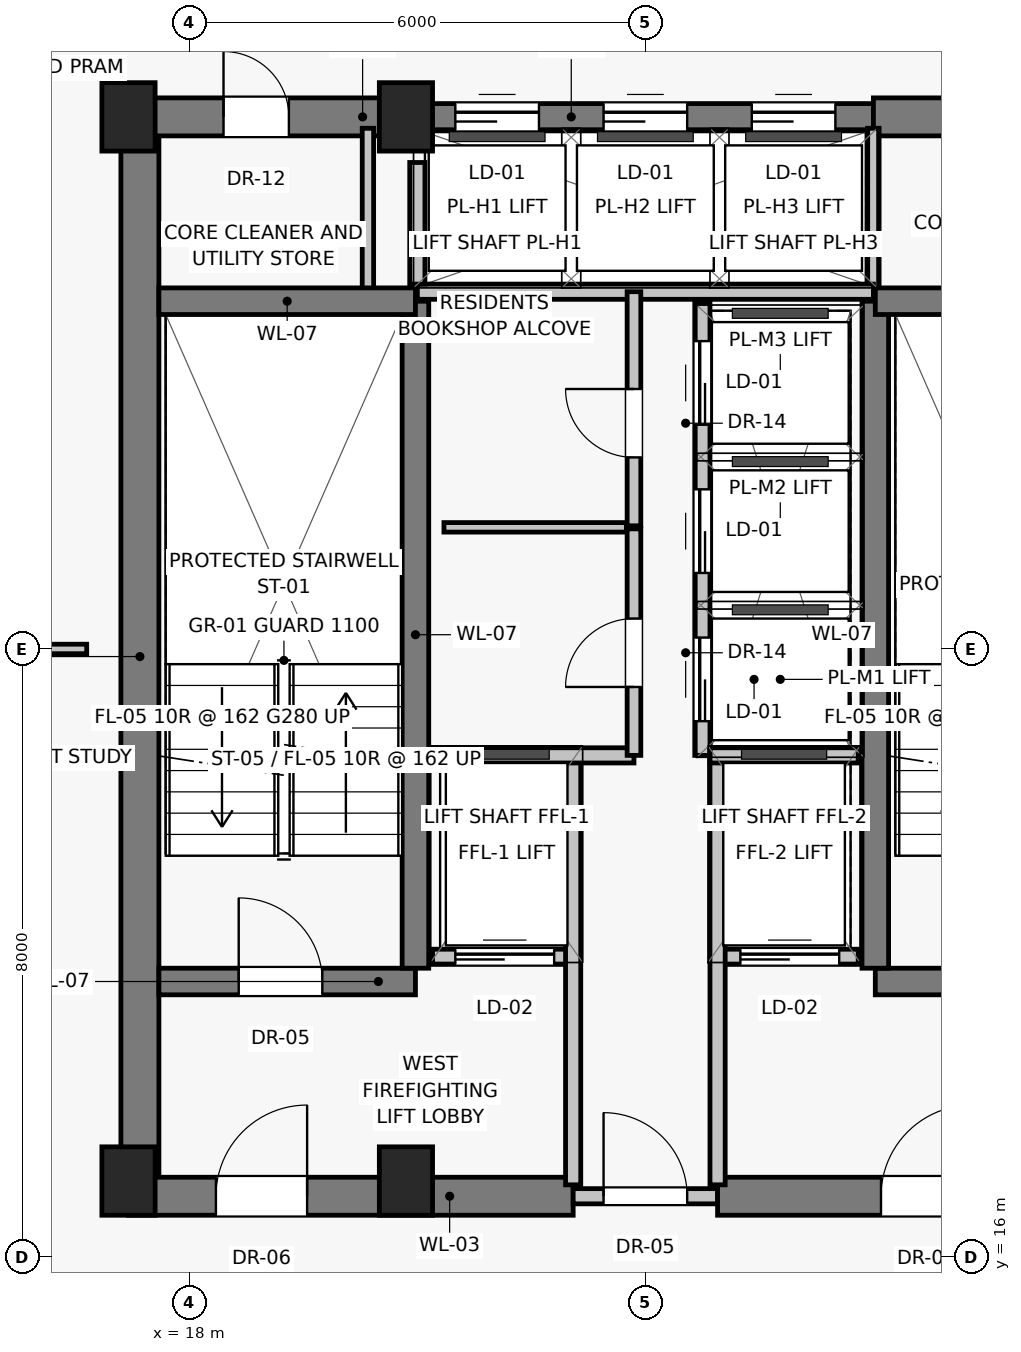
"""IFC4 building model, lengths in metres.
Left out: names, types, materials, properties, quantities, classifications, styles, units other than length and angle.
Written with IfcOpenShell. Run it as: python <this file> out.ifc"""

import sys

from ifc_helpers import new_model, si_unit, direction, frame, frame_2d, origin, origin_2d, place, context, subcontext, project, spatial, rectangle, extrude, source, transform, mapped, element, fill, save


model = new_model("IFC4")
c1 = context("Model", 3, precision=1e-05, world=origin(), true_north=direction((0.0, 1.0)))
c2 = subcontext(c1, "Body", "Model", "MODEL_VIEW")
j1 = project(units=[si_unit("LENGTHUNIT", "METRE"), si_unit("PLANEANGLEUNIT", "RADIAN")], contexts=[c1])
p1 = place(None, origin())
s1 = spatial("IfcSite", under=j1, at=p1, CompositionType="ELEMENT")
p2 = place(p1, origin())
s2 = spatial("IfcBuilding", under=s1, at=p2, CompositionType="ELEMENT")
p3 = place(p2, frame((0.0, 0.0, 178.85)))
s3 = spatial("IfcBuildingStorey", under=s2, at=p3, CompositionType="ELEMENT", Elevation=178.85)
for number, where, z_axis, x_axis in (
    (1, (17.2, 17.0, 0.0), (0.0, 0.0, 1.0), (1.0, 0.0, 0.0)),
    (2, (20.85, 17.0, 0.0), (0.0, 0.0, 1.0), (1.0, 0.0, 0.0)),
    (3, (17.2, 31.0, 0.0), (0.0, 0.0, 1.0), (1.0, 0.0, 0.0)),
    (4, (20.85, 31.0, 0.0), (0.0, 0.0, 1.0), (1.0, 0.0, 0.0)),
):
    element("IfcColumn", number, at=place(p3, frame(where, z_axis=z_axis, x_axis=x_axis)), inside=s3, PredefinedType="PILASTER", context=c2, shape_type="SweptSolid", body=[
        extrude(rectangle(XDim=0.7, YDim=0.9, at=origin_2d()), origin(), (0.0, 0.0, 1.0), 3.25),
    ])
p4 = place(p3, frame((17.35, 16.8, 0.0), z_axis=(0.0, 0.0, 1.0), x_axis=(0.0, 1.0, 0.0)))
e5 = element("IfcWall", 5, at=p4, inside=s3, PredefinedType="SHEAR", context=c2, shape_type="SweptSolid", body=[
    extrude(rectangle(XDim=14.2, YDim=0.5, at=frame_2d((7.1, 0.0))), origin(), (0.0, 0.0, 1.0), 3.015),
])
p5 = place(p3, frame((17.2, 16.8, 0.0), z_axis=(0.0, 0.0, 1.0), x_axis=(1.0, 0.0, 0.0)))
e6 = element("IfcWall", 6, at=p5, inside=s3, PredefinedType="SHEAR", context=c2, shape_type="SweptSolid", body=[
    extrude(rectangle(XDim=5.85, YDim=0.5, at=frame_2d((2.925, 0.0))), origin(), (0.0, 0.0, 1.0), 3.015),
])
p6 = place(p5, frame((1.15, 0.0, 0.0)))
e7 = element("IfcOpeningElement", 7, at=p6, cuts=e6, PredefinedType="OPENING", context=c2, shape_type="SweptSolid", body=[
    extrude(rectangle(XDim=1.2, YDim=2.03, at=frame_2d((0.6, 1.015))), frame((0.0, 0.26, 0.0), z_axis=(0.0, -1.0, 0.0), x_axis=(1.0, 0.0, 0.0)), (0.0, 0.0, 1.0), 0.52),
])
p7 = place(p3, frame((23.05, 16.8, 0.0), z_axis=(0.0, 0.0, 1.0), x_axis=(1.0, 0.0, 0.0)))
e8 = element("IfcWall", 8, at=p7, inside=s3, PredefinedType="SOLIDWALL", context=c2, shape_type="SweptSolid", body=[
    extrude(rectangle(XDim=1.9, YDim=0.2, at=frame_2d((0.95, 0.0))), origin(), (0.0, 0.0, 1.0), 2.165),
])
p8 = place(p7, frame((0.4, 0.0, 0.0)))
e9 = element("IfcOpeningElement", 9, at=p8, cuts=e8, PredefinedType="OPENING", context=c2, shape_type="SweptSolid", body=[
    extrude(rectangle(XDim=1.1, YDim=2.03, at=frame_2d((0.55, 1.015))), frame((0.0, 0.11, 0.0), z_axis=(0.0, -1.0, 0.0), x_axis=(1.0, 0.0, 0.0)), (0.0, 0.0, 1.0), 0.22),
])
p9 = place(p3, frame((24.95, 16.8, 0.0), z_axis=(0.0, 0.0, 1.0), x_axis=(1.0, 0.0, 0.0)))
e10 = element("IfcWall", 10, at=p9, inside=s3, PredefinedType="SHEAR", context=c2, shape_type="SweptSolid", body=[
    extrude(rectangle(XDim=5.85, YDim=0.5, at=frame_2d((2.925, 0.0))), origin(), (0.0, 0.0, 1.0), 3.015),
])
p10 = place(p9, frame((2.15, 0.0, 0.0)))
e11 = element("IfcOpeningElement", 11, at=p10, cuts=e10, PredefinedType="OPENING", context=c2, shape_type="SweptSolid", body=[
    extrude(rectangle(XDim=1.2, YDim=2.03, at=frame_2d((0.6, 1.015))), frame((0.0, 0.26, 0.0), z_axis=(0.0, -1.0, 0.0), x_axis=(1.0, 0.0, 0.0)), (0.0, 0.0, 1.0), 0.52),
])
p11 = place(p3, frame((17.2, 31.0, 0.0), z_axis=(0.0, 0.0, 1.0), x_axis=(1.0, 0.0, 0.0)))
e12 = element("IfcWall", 12, at=p11, inside=s3, PredefinedType="SHEAR", context=c2, shape_type="SweptSolid", body=[
    extrude(rectangle(XDim=3.8, YDim=0.5, at=frame_2d((1.9, 0.0))), origin(), (0.0, 0.0, 1.0), 3.015),
])
p12 = place(p11, frame((1.25, 0.0, 0.0)))
e13 = element("IfcOpeningElement", 13, at=p12, cuts=e12, PredefinedType="OPENING", context=c2, shape_type="SweptSolid", body=[
    extrude(rectangle(XDim=0.86, YDim=2.01, at=frame_2d((0.43, 1.005))), frame((0.0, 0.26, 0.0), z_axis=(0.0, -1.0, 0.0), x_axis=(1.0, 0.0, 0.0)), (0.0, 0.0, 1.0), 0.52),
])
p13 = place(p3, frame((21.0, 31.0, 0.0), z_axis=(0.0, 0.0, 1.0), x_axis=(1.0, 0.0, 0.0)))
e14 = element("IfcWall", 14, at=p13, inside=s3, PredefinedType="SHEAR", context=c2, shape_type="SweptSolid", body=[
    extrude(rectangle(XDim=6.0, YDim=0.35, at=frame_2d((3.0, 0.0))), origin(), (0.0, 0.0, 1.0), 3.015),
])
p14 = place(p13, frame((0.5, 0.0, 0.0)))
e15 = element("IfcOpeningElement", 15, at=p14, cuts=e14, PredefinedType="OPENING", context=c2, shape_type="SweptSolid", body=[
    extrude(rectangle(XDim=1.1, YDim=2.08, at=frame_2d((0.55, 1.04))), frame((0.0, 0.185, 0.0), z_axis=(0.0, -1.0, 0.0), x_axis=(1.0, 0.0, 0.0)), (0.0, 0.0, 1.0), 0.37),
])
p15 = place(p13, frame((2.45, 0.0, 0.0)))
e16 = element("IfcOpeningElement", 16, at=p15, cuts=e14, PredefinedType="OPENING", context=c2, shape_type="SweptSolid", body=[
    extrude(rectangle(XDim=1.1, YDim=2.08, at=frame_2d((0.55, 1.04))), frame((0.0, 0.185, 0.0), z_axis=(0.0, -1.0, 0.0), x_axis=(1.0, 0.0, 0.0)), (0.0, 0.0, 1.0), 0.37),
])
p16 = place(p13, frame((4.4, 0.0, 0.0)))
e17 = element("IfcOpeningElement", 17, at=p16, cuts=e14, PredefinedType="OPENING", context=c2, shape_type="SweptSolid", body=[
    extrude(rectangle(XDim=1.1, YDim=2.08, at=frame_2d((0.55, 1.04))), frame((0.0, 0.185, 0.0), z_axis=(0.0, -1.0, 0.0), x_axis=(1.0, 0.0, 0.0)), (0.0, 0.0, 1.0), 0.37),
])
p17 = place(p3, frame((27.0, 31.0, 0.0), z_axis=(0.0, 0.0, 1.0), x_axis=(1.0, 0.0, 0.0)))
e18 = element("IfcWall", 18, at=p17, inside=s3, PredefinedType="SHEAR", context=c2, shape_type="SweptSolid", body=[
    extrude(rectangle(XDim=3.8, YDim=0.5, at=frame_2d((1.9, 0.0))), origin(), (0.0, 0.0, 1.0), 3.015),
])
p18 = place(p17, frame((1.15, 0.0, 0.0)))
e19 = element("IfcOpeningElement", 19, at=p18, cuts=e18, PredefinedType="OPENING", context=c2, shape_type="SweptSolid", body=[
    extrude(rectangle(XDim=1.0, YDim=2.01, at=frame_2d((0.5, 1.005))), frame((0.0, 0.26, 0.0), z_axis=(0.0, -1.0, 0.0), x_axis=(1.0, 0.0, 0.0)), (0.0, 0.0, 1.0), 0.52),
])
for number, where, z_axis, x_axis in (
    (20, (20.35, 28.65, 0.0), (0.0, 0.0, 1.0), (0.0, 1.0, 0.0)),
    (21, (27.0, 28.65, 0.0), (0.0, 0.0, 1.0), (0.0, 1.0, 0.0)),
):
    element("IfcWall", number, at=place(p3, frame(where, z_axis=z_axis, x_axis=x_axis)), inside=s3, PredefinedType="PARTITIONING", context=c2, shape_type="SweptSolid", body=[
        extrude(rectangle(XDim=2.2, YDim=0.15, at=frame_2d((1.1, 0.0))), origin(), (0.0, 0.0, 1.0), 3.015),
    ])
p19 = place(p3, frame((17.6, 19.625, 0.0), z_axis=(0.0, 0.0, 1.0), x_axis=(1.0, 0.0, 0.0)))
e22 = element("IfcWall", 22, at=p19, inside=s3, PredefinedType="SHEAR", context=c2, shape_type="SweptSolid", body=[
    extrude(rectangle(XDim=3.375, YDim=0.35, at=frame_2d((1.688, 0.0))), origin(), (0.0, 0.0, 1.0), 3.015),
])
p20 = place(p19, frame((1.05, 0.0, 0.0)))
e23 = element("IfcOpeningElement", 23, at=p20, cuts=e22, PredefinedType="OPENING", context=c2, shape_type="SweptSolid", body=[
    extrude(rectangle(XDim=1.1, YDim=2.03, at=frame_2d((0.55, 1.015))), frame((0.0, 0.185, 0.0), z_axis=(0.0, -1.0, 0.0), x_axis=(1.0, 0.0, 0.0)), (0.0, 0.0, 1.0), 0.37),
])
p21 = place(p3, frame((21.2, 19.95, 0.0), z_axis=(0.0, 0.0, 1.0), x_axis=(1.0, 0.0, 0.0)))
e24 = element("IfcWall", 24, at=p21, inside=s3, PredefinedType="SOLIDWALL", context=c2, shape_type="SweptSolid", body=[
    extrude(rectangle(XDim=1.85, YDim=0.2, at=frame_2d((0.925, 0.0))), origin(), (0.0, 0.0, 1.0), 3.015),
])
p22 = place(p21, frame((0.3, 0.0, 0.0)))
e25 = element("IfcOpeningElement", 25, at=p22, cuts=e24, PredefinedType="OPENING", context=c2, shape_type="SweptSolid", body=[
    extrude(rectangle(XDim=1.3, YDim=2.25, at=frame_2d((0.65, 1.125))), frame((0.0, 0.11, 0.0), z_axis=(0.0, -1.0, 0.0), x_axis=(1.0, 0.0, 0.0)), (0.0, 0.0, 1.0), 0.22),
])
p23 = place(p3, frame((24.95, 19.95, 0.0), z_axis=(0.0, 0.0, 1.0), x_axis=(1.0, 0.0, 0.0)))
e26 = element("IfcWall", 26, at=p23, inside=s3, PredefinedType="SOLIDWALL", context=c2, shape_type="SweptSolid", body=[
    extrude(rectangle(XDim=1.85, YDim=0.2, at=frame_2d((0.925, 0.0))), origin(), (0.0, 0.0, 1.0), 3.015),
])
p24 = place(p23, frame((0.3, 0.0, 0.0)))
e27 = element("IfcOpeningElement", 27, at=p24, cuts=e26, PredefinedType="OPENING", context=c2, shape_type="SweptSolid", body=[
    extrude(rectangle(XDim=1.3, YDim=2.25, at=frame_2d((0.65, 1.125))), frame((0.0, 0.11, 0.0), z_axis=(0.0, -1.0, 0.0), x_axis=(1.0, 0.0, 0.0)), (0.0, 0.0, 1.0), 0.22),
])
p25 = place(p3, frame((27.025, 19.625, 0.0), z_axis=(0.0, 0.0, 1.0), x_axis=(1.0, 0.0, 0.0)))
e28 = element("IfcWall", 28, at=p25, inside=s3, PredefinedType="SHEAR", context=c2, shape_type="SweptSolid", body=[
    extrude(rectangle(XDim=3.375, YDim=0.35, at=frame_2d((1.688, 0.0))), origin(), (0.0, 0.0, 1.0), 3.015),
])
p26 = place(p25, frame((1.05, 0.0, 0.0)))
e29 = element("IfcOpeningElement", 29, at=p26, cuts=e28, PredefinedType="OPENING", context=c2, shape_type="SweptSolid", body=[
    extrude(rectangle(XDim=1.1, YDim=2.03, at=frame_2d((0.55, 1.015))), frame((0.0, 0.185, 0.0), z_axis=(0.0, -1.0, 0.0), x_axis=(1.0, 0.0, 0.0)), (0.0, 0.0, 1.0), 0.37),
])
for number, where, z_axis, x_axis in (
    (30, (20.975, 19.8, 0.0), (0.0, 0.0, 1.0), (0.0, 1.0, 0.0)),
    (31, (27.025, 19.8, 0.0), (0.0, 0.0, 1.0), (0.0, 1.0, 0.0)),
):
    element("IfcWall", number, at=place(p3, frame(where, z_axis=z_axis, x_axis=x_axis)), inside=s3, PredefinedType="SHEAR", context=c2, shape_type="SweptSolid", body=[
        extrude(rectangle(XDim=8.775, YDim=0.35, at=frame_2d((4.387, 0.0))), origin(), (0.0, 0.0, 1.0), 3.015),
    ])
for number, where, z_axis, x_axis in (
    (32, (17.6, 28.575, 0.0), (0.0, 0.0, 1.0), (1.0, 0.0, 0.0)),
    (33, (27.025, 28.575, 0.0), (0.0, 0.0, 1.0), (1.0, 0.0, 0.0)),
):
    element("IfcWall", number, at=place(p3, frame(where, z_axis=z_axis, x_axis=x_axis)), inside=s3, PredefinedType="SHEAR", context=c2, shape_type="SweptSolid", body=[
        extrude(rectangle(XDim=3.375, YDim=0.35, at=frame_2d((1.688, 0.0))), origin(), (0.0, 0.0, 1.0), 3.015),
    ])
for number, where, z_axis, x_axis in (
    (34, (23.05, 16.95, 0.0), (0.0, 0.0, 1.0), (0.0, 1.0, 0.0)),
    (35, (24.95, 16.95, 0.0), (0.0, 0.0, 1.0), (0.0, 1.0, 0.0)),
):
    element("IfcWall", number, at=place(p3, frame(where, z_axis=z_axis, x_axis=x_axis)), inside=s3, PredefinedType="SOLIDWALL", context=c2, shape_type="SweptSolid", body=[
        extrude(rectangle(XDim=5.6, YDim=0.2, at=frame_2d((2.8, 0.0))), origin(), (0.0, 0.0, 1.0), 3.015),
    ])
p27 = place(p3, frame((21.2, 22.6, 0.0), z_axis=(0.0, 0.0, 1.0), x_axis=(1.0, 0.0, 0.0)))
e36 = element("IfcWall", 36, at=p27, inside=s3, PredefinedType="SOLIDWALL", context=c2, shape_type="SweptSolid", body=[
    extrude(rectangle(XDim=2.65, YDim=0.2, at=frame_2d((1.325, 0.0))), origin(), (0.0, 0.0, 1.0), 3.015),
])
p28 = place(p3, frame((24.85, 22.6, 0.0), z_axis=(0.0, 0.0, 1.0), x_axis=(1.0, 0.0, 0.0)))
e37 = element("IfcWall", 37, at=p28, inside=s3, PredefinedType="SOLIDWALL", context=c2, shape_type="SweptSolid", body=[
    extrude(rectangle(XDim=1.95, YDim=0.2, at=frame_2d((0.975, 0.0))), origin(), (0.0, 0.0, 1.0), 3.015),
])
p29 = place(p3, frame((21.0, 28.7, 0.0), z_axis=(0.0, 0.0, 1.0), x_axis=(1.0, 0.0, 0.0)))
e38 = element("IfcWall", 38, at=p29, inside=s3, PredefinedType="SOLIDWALL", context=c2, shape_type="SweptSolid", body=[
    extrude(rectangle(XDim=6.0, YDim=0.2, at=frame_2d((3.0, 0.0))), origin(), (0.0, 0.0, 1.0), 3.015),
])
p30 = place(p3, frame((21.0, 28.8, 0.0), z_axis=(0.0, 0.0, 1.0), x_axis=(0.0, 1.0, 0.0)))
e39 = element("IfcWall", 39, at=p30, inside=s3, PredefinedType="SOLIDWALL", context=c2, shape_type="SweptSolid", body=[
    extrude(rectangle(XDim=1.6, YDim=0.2, at=frame_2d((0.8, 0.0))), origin(), (0.0, 0.0, 1.0), 3.015),
])
p31 = place(p3, frame((23.85, 22.6, 0.0), z_axis=(0.0, 0.0, 1.0), x_axis=(0.0, 1.0, 0.0)))
e40 = element("IfcWall", 40, at=p31, inside=s3, PredefinedType="PARTITIONING", context=c2, shape_type="SweptSolid", body=[
    extrude(rectangle(XDim=2.98, YDim=0.18, at=frame_2d((1.49, 0.0))), origin(), (0.0, 0.0, 1.0), 3.015),
])
p32 = place(p31, frame((0.9, 0.0, 0.0)))
e41 = element("IfcOpeningElement", 41, at=p32, cuts=e40, PredefinedType="OPENING", context=c2, shape_type="SweptSolid", body=[
    extrude(rectangle(XDim=0.9, YDim=2.01, at=frame_2d((0.45, 1.005))), frame((0.0, 0.1, 0.0), z_axis=(0.0, -1.0, 0.0), x_axis=(1.0, 0.0, 0.0)), (0.0, 0.0, 1.0), 0.2),
])
p33 = place(p3, frame((23.85, 25.62, 0.0), z_axis=(0.0, 0.0, 1.0), x_axis=(0.0, 1.0, 0.0)))
e42 = element("IfcWall", 42, at=p33, inside=s3, PredefinedType="PARTITIONING", context=c2, shape_type="SweptSolid", body=[
    extrude(rectangle(XDim=3.08, YDim=0.18, at=frame_2d((1.54, 0.0))), origin(), (0.0, 0.0, 1.0), 3.015),
])
p34 = place(p33, frame((0.9, 0.0, 0.0)))
e43 = element("IfcOpeningElement", 43, at=p34, cuts=e42, PredefinedType="OPENING", context=c2, shape_type="SweptSolid", body=[
    extrude(rectangle(XDim=0.9, YDim=2.01, at=frame_2d((0.45, 1.005))), frame((0.0, 0.1, 0.0), z_axis=(0.0, -1.0, 0.0), x_axis=(1.0, 0.0, 0.0)), (0.0, 0.0, 1.0), 0.2),
])
p35 = place(p3, frame((24.75, 22.6, 0.0), z_axis=(0.0, 0.0, 1.0), x_axis=(0.0, 1.0, 0.0)))
e44 = element("IfcWall", 44, at=p35, inside=s3, PredefinedType="SOLIDWALL", context=c2, shape_type="SweptSolid", body=[
    extrude(rectangle(XDim=5.95, YDim=0.2, at=frame_2d((2.975, 0.0))), origin(), (0.0, 0.0, 1.0), 3.015),
])
p36 = place(p35, frame((0.45, 0.0, 0.0)))
e45 = element("IfcOpeningElement", 45, at=p36, cuts=e44, PredefinedType="OPENING", context=c2, shape_type="SweptSolid", body=[
    extrude(rectangle(XDim=1.1, YDim=2.08, at=frame_2d((0.55, 1.04))), frame((0.0, 0.11, 0.0), z_axis=(0.0, -1.0, 0.0), x_axis=(1.0, 0.0, 0.0)), (0.0, 0.0, 1.0), 0.22),
])
p37 = place(p35, frame((2.4, 0.0, 0.0)))
e46 = element("IfcOpeningElement", 46, at=p37, cuts=e44, PredefinedType="OPENING", context=c2, shape_type="SweptSolid", body=[
    extrude(rectangle(XDim=1.1, YDim=2.08, at=frame_2d((0.55, 1.04))), frame((0.0, 0.11, 0.0), z_axis=(0.0, -1.0, 0.0), x_axis=(1.0, 0.0, 0.0)), (0.0, 0.0, 1.0), 0.22),
])
p38 = place(p35, frame((4.35, 0.0, 0.0)))
e47 = element("IfcOpeningElement", 47, at=p38, cuts=e44, PredefinedType="OPENING", context=c2, shape_type="SweptSolid", body=[
    extrude(rectangle(XDim=1.1, YDim=2.08, at=frame_2d((0.55, 1.04))), frame((0.0, 0.11, 0.0), z_axis=(0.0, -1.0, 0.0), x_axis=(1.0, 0.0, 0.0)), (0.0, 0.0, 1.0), 0.22),
])
p39 = place(p3, frame((21.35, 25.6, 0.0), z_axis=(0.0, 0.0, 1.0), x_axis=(1.0, 0.0, 0.0)))
e48 = element("IfcWall", 48, at=p39, inside=s3, PredefinedType="PARTITIONING", context=c2, shape_type="SweptSolid", body=[
    extrude(rectangle(XDim=2.4, YDim=0.125, at=frame_2d((1.2, 0.0))), origin(), (0.0, 0.0, 1.0), 3.015),
])
p40 = place(p3, frame((14.55, 24.0, 0.0), z_axis=(0.0, 0.0, 1.0), x_axis=(1.0, 0.0, 0.0)))
e49 = element("IfcWall", 49, at=p40, inside=s3, PredefinedType="PARTITIONING", context=c2, shape_type="SweptSolid", body=[
    extrude(rectangle(XDim=2.1, YDim=0.125, at=frame_2d((1.05, 0.0))), origin(), (0.0, 0.0, 1.0), 3.015),
])
m1 = source(origin(), c2, "Body", "SweptSolid", [
    extrude(rectangle(XDim=1.2, YDim=2.03, at=frame_2d((0.6, 1.015))), frame((0.0, 0.025, 0.0), z_axis=(0.0, -1.0, 0.0), x_axis=(1.0, 0.0, 0.0)), (0.0, 0.0, 1.0), 0.05),
])
p41 = place(p6, origin())
e50 = element("IfcDoor", 50, at=p41, inside=s3, OperationType="SINGLE_SWING_RIGHT", PredefinedType="DOOR", context=c2, shape_type="MappedRepresentation", body=[
    mapped(m1, transform((0.0, 0.0, 0.0), scale=1.0)),
])
fill(e7, e50)
m2 = source(origin(), c2, "Body", "SweptSolid", [
    extrude(rectangle(XDim=1.1, YDim=2.03, at=frame_2d((0.55, 1.015))), frame((0.0, 0.025, 0.0), z_axis=(0.0, -1.0, 0.0), x_axis=(1.0, 0.0, 0.0)), (0.0, 0.0, 1.0), 0.05),
])
p42 = place(p8, origin())
e51 = element("IfcDoor", 51, at=p42, inside=s3, OperationType="SINGLE_SWING_LEFT", PredefinedType="DOOR", context=c2, shape_type="MappedRepresentation", body=[
    mapped(m2, transform((0.0, 0.0, 0.0), scale=1.0)),
])
fill(e9, e51)
p43 = place(p10, origin())
e52 = element("IfcDoor", 52, at=p43, inside=s3, OperationType="SINGLE_SWING_RIGHT", PredefinedType="DOOR", context=c2, shape_type="MappedRepresentation", body=[
    mapped(m1, transform((0.0, 0.0, 0.0), scale=1.0)),
])
fill(e11, e52)
m3 = source(origin(), c2, "Body", "SweptSolid", [
    extrude(rectangle(XDim=0.86, YDim=2.01, at=frame_2d((0.43, 1.005))), frame((0.0, 0.025, 0.0), z_axis=(0.0, -1.0, 0.0), x_axis=(1.0, 0.0, 0.0)), (0.0, 0.0, 1.0), 0.05),
])
p44 = place(p12, origin())
e53 = element("IfcDoor", 53, at=p44, inside=s3, OperationType="SINGLE_SWING_LEFT", PredefinedType="DOOR", context=c2, shape_type="MappedRepresentation", body=[
    mapped(m3, transform((0.0, 0.0, 0.0), scale=1.0)),
])
fill(e13, e53)
m4 = source(origin(), c2, "Body", "SweptSolid", [
    extrude(rectangle(XDim=1.1, YDim=2.08, at=frame_2d((0.55, 1.04))), frame((0.0, 0.025, 0.0), z_axis=(0.0, -1.0, 0.0), x_axis=(1.0, 0.0, 0.0)), (0.0, 0.0, 1.0), 0.05),
])
p45 = place(p14, origin())
e54 = element("IfcDoor", 54, at=p45, inside=s3, OperationType="SLIDING_TO_LEFT", PredefinedType="DOOR", context=c2, shape_type="MappedRepresentation", body=[
    mapped(m4, transform((0.0, 0.0, 0.0), scale=1.0)),
])
fill(e15, e54)
p46 = place(p15, origin())
e55 = element("IfcDoor", 55, at=p46, inside=s3, OperationType="SLIDING_TO_LEFT", PredefinedType="DOOR", context=c2, shape_type="MappedRepresentation", body=[
    mapped(m4, transform((0.0, 0.0, 0.0), scale=1.0)),
])
fill(e16, e55)
p47 = place(p16, origin())
e56 = element("IfcDoor", 56, at=p47, inside=s3, OperationType="SLIDING_TO_LEFT", PredefinedType="DOOR", context=c2, shape_type="MappedRepresentation", body=[
    mapped(m4, transform((0.0, 0.0, 0.0), scale=1.0)),
])
fill(e17, e56)
p48 = place(p20, origin())
e57 = element("IfcDoor", 57, at=p48, inside=s3, OperationType="SINGLE_SWING_LEFT", PredefinedType="DOOR", context=c2, shape_type="MappedRepresentation", body=[
    mapped(m2, transform((0.0, 0.0, 0.0), scale=1.0)),
])
fill(e23, e57)
m5 = source(origin(), c2, "Body", "SweptSolid", [
    extrude(rectangle(XDim=1.3, YDim=2.25, at=frame_2d((0.65, 1.125))), frame((0.0, 0.025, 0.0), z_axis=(0.0, -1.0, 0.0), x_axis=(1.0, 0.0, 0.0)), (0.0, 0.0, 1.0), 0.05),
])
p49 = place(p22, origin())
e58 = element("IfcDoor", 58, at=p49, inside=s3, OperationType="SLIDING_TO_LEFT", PredefinedType="DOOR", context=c2, shape_type="MappedRepresentation", body=[
    mapped(m5, transform((0.0, 0.0, 0.0), scale=1.0)),
])
fill(e25, e58)
p50 = place(p24, origin())
e59 = element("IfcDoor", 59, at=p50, inside=s3, OperationType="SLIDING_TO_LEFT", PredefinedType="DOOR", context=c2, shape_type="MappedRepresentation", body=[
    mapped(m5, transform((0.0, 0.0, 0.0), scale=1.0)),
])
fill(e27, e59)
m6 = source(origin(), c2, "Body", "SweptSolid", [
    extrude(rectangle(XDim=0.9, YDim=2.01, at=frame_2d((0.45, 1.005))), frame((0.0, 0.025, 0.0), z_axis=(0.0, -1.0, 0.0), x_axis=(1.0, 0.0, 0.0)), (0.0, 0.0, 1.0), 0.05),
])
p51 = place(p32, origin())
e60 = element("IfcDoor", 60, at=p51, inside=s3, OperationType="SINGLE_SWING_LEFT", PredefinedType="DOOR", context=c2, shape_type="MappedRepresentation", body=[
    mapped(m6, transform((0.0, 0.0, 0.0), scale=1.0)),
])
fill(e41, e60)
p52 = place(p34, origin())
e61 = element("IfcDoor", 61, at=p52, inside=s3, OperationType="SINGLE_SWING_RIGHT", PredefinedType="DOOR", context=c2, shape_type="MappedRepresentation", body=[
    mapped(m6, transform((0.0, 0.0, 0.0), scale=1.0)),
])
fill(e43, e61)
p53 = place(p36, origin())
e62 = element("IfcDoor", 62, at=p53, inside=s3, OperationType="SLIDING_TO_LEFT", PredefinedType="DOOR", context=c2, shape_type="MappedRepresentation", body=[
    mapped(m4, transform((0.0, 0.0, 0.0), scale=1.0)),
])
fill(e45, e62)
p54 = place(p37, origin())
e63 = element("IfcDoor", 63, at=p54, inside=s3, OperationType="SLIDING_TO_LEFT", PredefinedType="DOOR", context=c2, shape_type="MappedRepresentation", body=[
    mapped(m4, transform((0.0, 0.0, 0.0), scale=1.0)),
])
fill(e46, e63)
p55 = place(p38, origin())
e64 = element("IfcDoor", 64, at=p55, inside=s3, OperationType="SLIDING_TO_LEFT", PredefinedType="DOOR", context=c2, shape_type="MappedRepresentation", body=[
    mapped(m4, transform((0.0, 0.0, 0.0), scale=1.0)),
])
fill(e47, e64)
save(model, sys.argv[1])
